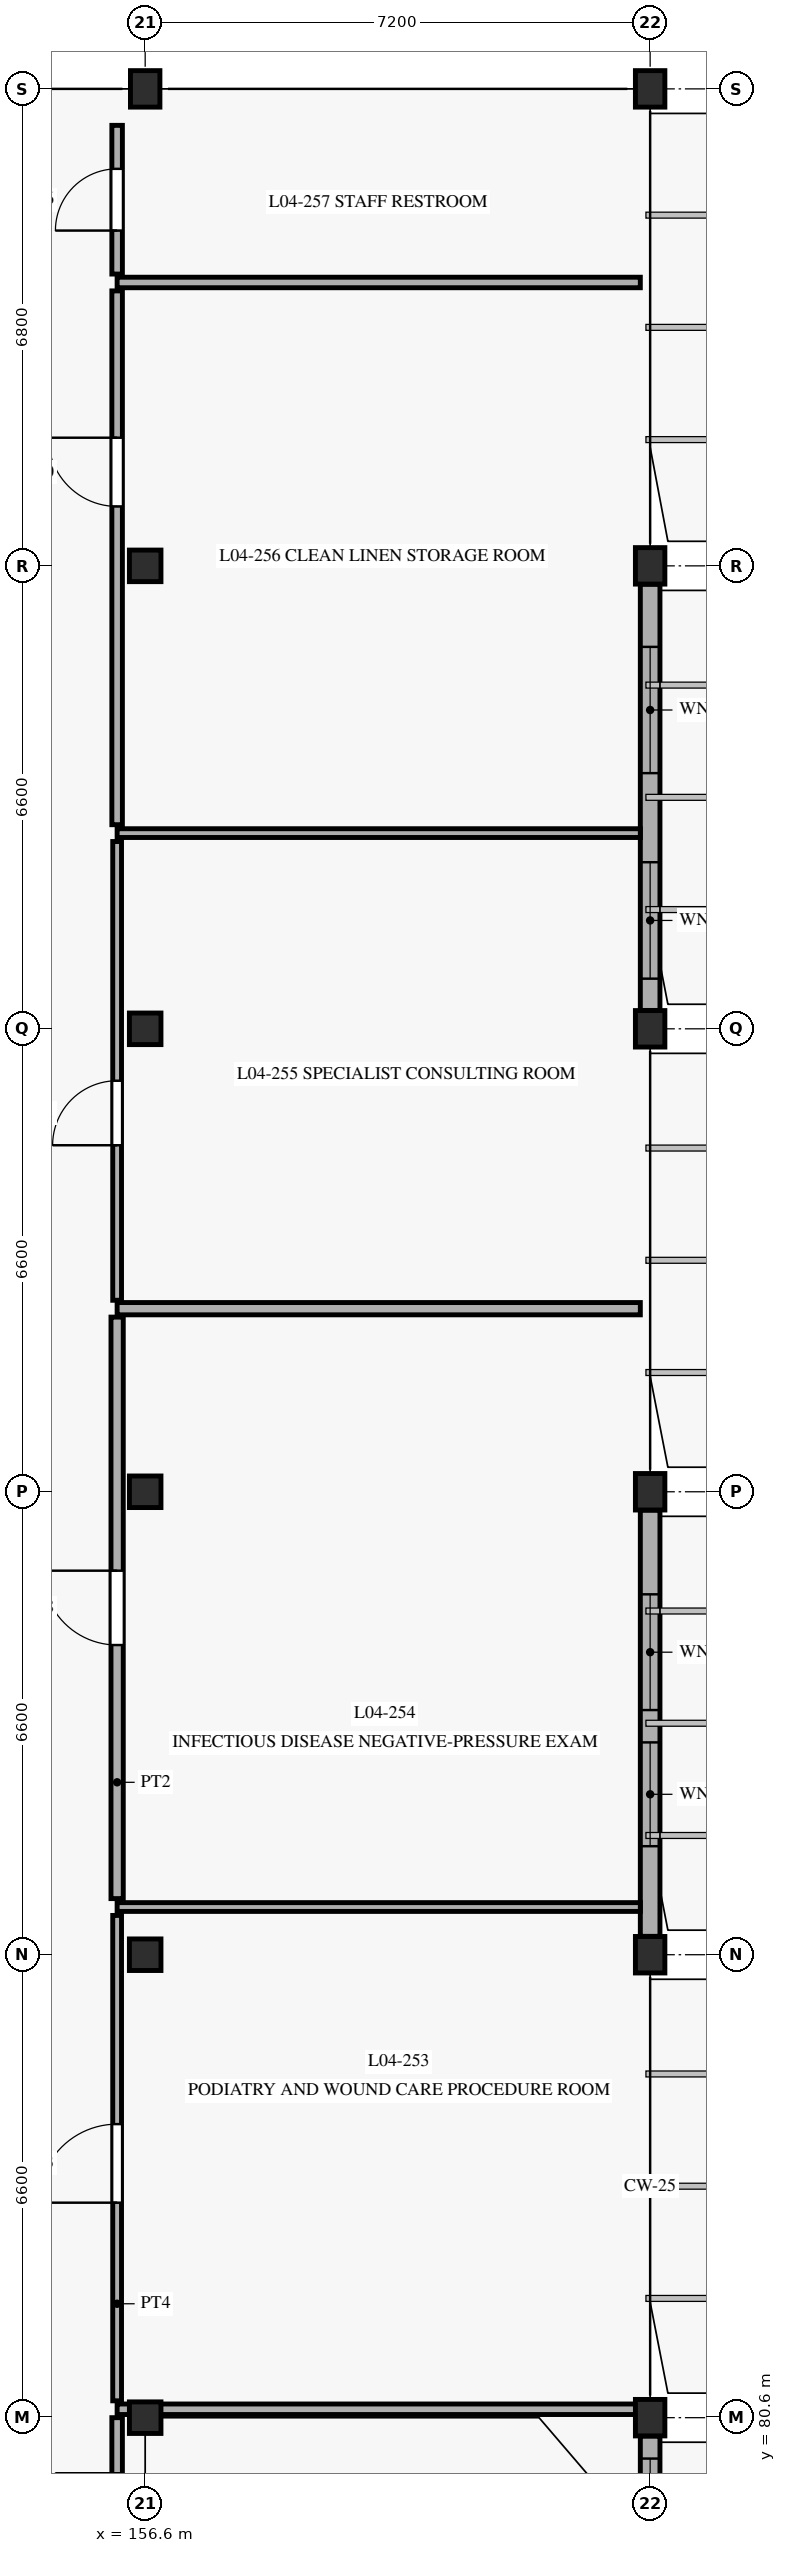
"""IFC4 building model, lengths in metres.
Left out: names, types, materials, properties, quantities, classifications, styles, units other than length and angle.
Written with IfcOpenShell. Run it as: python <this file> out.ifc"""

import sys

from ifc_helpers import new_model, si_unit, direction, frame, frame_2d, origin, origin_with_axes, origin_2d, place, context, subcontext, project, spatial, rectangle, extrude, element, fill, save


model = new_model("IFC4")
c1 = context("Model", 3, precision=1e-05, world=origin(), true_north=direction((0.0, 1.0)))
c2 = subcontext(c1, "Body", "Model", "MODEL_VIEW")
j1 = project(units=[si_unit("LENGTHUNIT", "METRE"), si_unit("PLANEANGLEUNIT", "RADIAN")], contexts=[c1])
p1 = place(None, origin())
s1 = spatial("IfcSite", under=j1, at=p1, CompositionType="ELEMENT")
p2 = place(p1, origin())
s2 = spatial("IfcBuilding", under=s1, at=p2, CompositionType="ELEMENT")
p3 = place(p2, frame((0.0, 0.0, 13.5)))
s3 = spatial("IfcBuildingStorey", under=s2, at=p3, CompositionType="ELEMENT", Elevation=13.5)
for number, where, z_axis, x_axis in (
    (1, (156.6, 80.6, 0.0), (0.0, 0.0, 1.0), (1.0, 0.0, 0.0)),
    (2, (156.6, 87.2, 0.0), (0.0, 0.0, 1.0), (1.0, 0.0, 0.0)),
    (3, (156.6, 93.8, 0.0), (0.0, 0.0, 1.0), (1.0, 0.0, 0.0)),
    (4, (156.6, 100.4, 0.0), (0.0, 0.0, 1.0), (1.0, 0.0, 0.0)),
    (5, (156.6, 107.0, 0.0), (0.0, 0.0, 1.0), (1.0, 0.0, 0.0)),
):
    element("IfcColumn", number, at=place(p3, frame(where, z_axis=z_axis, x_axis=x_axis)), inside=s3, PredefinedType="COLUMN", context=c2, shape_type="SweptSolid", body=[
        extrude(rectangle(XDim=0.45, YDim=0.45, at=origin_2d()), origin(), (0.0, 0.0, 1.0), 4.05),
    ])
for number, where, z_axis, x_axis in (
    (6, (156.6, 113.8, 0.0), (0.0, 0.0, 1.0), (1.0, 0.0, 0.0)),
    (7, (163.8, 80.6, 0.0), (0.0, 0.0, 1.0), (1.0, 0.0, 0.0)),
    (8, (163.8, 87.2, 0.0), (0.0, 0.0, 1.0), (1.0, 0.0, 0.0)),
    (9, (163.8, 93.8, 0.0), (0.0, 0.0, 1.0), (1.0, 0.0, 0.0)),
    (10, (163.8, 100.4, 0.0), (0.0, 0.0, 1.0), (1.0, 0.0, 0.0)),
    (11, (163.8, 107.0, 0.0), (0.0, 0.0, 1.0), (1.0, 0.0, 0.0)),
    (12, (163.8, 113.8, 0.0), (0.0, 0.0, 1.0), (1.0, 0.0, 0.0)),
):
    element("IfcColumn", number, at=place(p3, frame(where, z_axis=z_axis, x_axis=x_axis)), inside=s3, PredefinedType="COLUMN", context=c2, shape_type="SweptSolid", body=[
        extrude(rectangle(XDim=0.42, YDim=0.52, at=origin_2d()), origin(), (0.0, 0.0, 1.0), 4.05),
    ])
p4 = place(p3, frame((163.8, 72.462, 0.0), z_axis=(0.0, 0.0, 1.0), x_axis=(0.0, 1.0, 0.0)))
e13 = element("IfcWall", 13, at=p4, inside=s3, PredefinedType="SOLIDWALL", context=c2, shape_type="SweptSolid", body=[
    extrude(rectangle(XDim=7.876, YDim=0.28, at=frame_2d((3.938, 0.0))), origin(), (0.0, 0.0, 1.0), 3.42),
])
p5 = place(p4, frame((2.306, 0.0, 0.88)))
e14 = element("IfcOpeningElement", 14, at=p5, cuts=e13, PredefinedType="OPENING", context=c2, shape_type="SweptSolid", body=[
    extrude(rectangle(XDim=1.32, YDim=2.15, at=frame_2d((0.66, 1.075))), frame((0.0, 0.15, 0.0), z_axis=(0.0, -1.0, 0.0), x_axis=(1.0, 0.0, 0.0)), (0.0, 0.0, 1.0), 0.3),
])
p6 = place(p4, frame((6.205, 0.0, 0.88)))
e15 = element("IfcOpeningElement", 15, at=p6, cuts=e13, PredefinedType="OPENING", context=c2, shape_type="SweptSolid", body=[
    extrude(rectangle(XDim=1.35, YDim=1.85, at=frame_2d((0.675, 0.925))), frame((0.0, 0.15, 0.0), z_axis=(0.0, -1.0, 0.0), x_axis=(1.0, 0.0, 0.0)), (0.0, 0.0, 1.0), 0.3),
])
p7 = place(p3, frame((163.8, 87.462, 0.0), z_axis=(0.0, 0.0, 1.0), x_axis=(0.0, 1.0, 0.0)))
e16 = element("IfcWall", 16, at=p7, inside=s3, PredefinedType="SOLIDWALL", context=c2, shape_type="SweptSolid", body=[
    extrude(rectangle(XDim=6.076, YDim=0.28, at=frame_2d((3.038, 0.0))), origin(), (0.0, 0.0, 1.0), 3.42),
])
p8 = place(p7, frame((1.285, 0.0, 0.88)))
e17 = element("IfcOpeningElement", 17, at=p8, cuts=e16, PredefinedType="OPENING", context=c2, shape_type="SweptSolid", body=[
    extrude(rectangle(XDim=1.48, YDim=2.15, at=frame_2d((0.74, 1.075))), frame((0.0, 0.15, 0.0), z_axis=(0.0, -1.0, 0.0), x_axis=(1.0, 0.0, 0.0)), (0.0, 0.0, 1.0), 0.3),
])
p9 = place(p7, frame((3.226, 0.0, 0.88)))
e18 = element("IfcOpeningElement", 18, at=p9, cuts=e16, PredefinedType="OPENING", context=c2, shape_type="SweptSolid", body=[
    extrude(rectangle(XDim=1.65, YDim=1.85, at=frame_2d((0.825, 0.925))), frame((0.0, 0.15, 0.0), z_axis=(0.0, -1.0, 0.0), x_axis=(1.0, 0.0, 0.0)), (0.0, 0.0, 1.0), 0.3),
])
p10 = place(p3, frame((163.8, 100.662, 0.0), z_axis=(0.0, 0.0, 1.0), x_axis=(0.0, 1.0, 0.0)))
e19 = element("IfcWall", 19, at=p10, inside=s3, PredefinedType="SOLIDWALL", context=c2, shape_type="SweptSolid", body=[
    extrude(rectangle(XDim=6.076, YDim=0.28, at=frame_2d((3.038, 0.0))), origin(), (0.0, 0.0, 1.0), 3.42),
])
p11 = place(p10, frame((0.453, 0.0, 0.88)))
e20 = element("IfcOpeningElement", 20, at=p11, cuts=e19, PredefinedType="OPENING", context=c2, shape_type="SweptSolid", body=[
    extrude(rectangle(XDim=1.66, YDim=2.15, at=frame_2d((0.83, 1.075))), frame((0.0, 0.15, 0.0), z_axis=(0.0, -1.0, 0.0), x_axis=(1.0, 0.0, 0.0)), (0.0, 0.0, 1.0), 0.3),
])
p12 = place(p10, frame((3.383, 0.0, 0.88)))
e21 = element("IfcOpeningElement", 21, at=p12, cuts=e19, PredefinedType="OPENING", context=c2, shape_type="SweptSolid", body=[
    extrude(rectangle(XDim=1.8, YDim=1.85, at=frame_2d((0.9, 0.925))), frame((0.0, 0.15, 0.0), z_axis=(0.0, -1.0, 0.0), x_axis=(1.0, 0.0, 0.0)), (0.0, 0.0, 1.0), 0.3),
])
p13 = place(p3, frame((156.2, 78.49, 0.0), z_axis=(0.0, 0.0, 1.0), x_axis=(0.0, 1.0, 0.0)))
e22 = element("IfcWall", 22, at=p13, inside=s3, PredefinedType="PARTITIONING", context=c2, shape_type="SweptSolid", body=[
    extrude(rectangle(XDim=2.11, YDim=0.15, at=frame_2d((1.055, 0.0))), origin(), (0.0, 0.0, 1.0), 3.365),
])
p14 = place(p13, frame((0.438, 0.0, 0.0)))
e23 = element("IfcOpeningElement", 23, at=p14, cuts=e22, PredefinedType="OPENING", context=c2, shape_type="SweptSolid", body=[
    extrude(rectangle(XDim=0.88, YDim=2.1, at=frame_2d((0.44, 1.05))), frame((0.0, 0.085, 0.0), z_axis=(0.0, -1.0, 0.0), x_axis=(1.0, 0.0, 0.0)), (0.0, 0.0, 1.0), 0.17),
])
p15 = place(p3, frame((156.2, 80.72, 0.0), z_axis=(0.0, 0.0, 1.0), x_axis=(1.0, 0.0, 0.0)))
e24 = element("IfcWall", 24, at=p15, inside=s3, PredefinedType="PARTITIONING", context=c2, shape_type="SweptSolid", body=[
    extrude(rectangle(XDim=7.46, YDim=0.15, at=frame_2d((3.73, 0.0))), origin(), (0.0, 0.0, 1.0), 3.365),
])
p16 = place(p3, frame((156.2, 80.84, 0.0), z_axis=(0.0, 0.0, 1.0), x_axis=(0.0, 1.0, 0.0)))
e25 = element("IfcWall", 25, at=p16, inside=s3, PredefinedType="PARTITIONING", context=c2, shape_type="SweptSolid", body=[
    extrude(rectangle(XDim=6.92, YDim=0.125, at=frame_2d((3.46, 0.0))), origin(), (0.0, 0.0, 1.0), 3.365),
])
p17 = place(p16, frame((2.825, 0.0, 0.0)))
e26 = element("IfcOpeningElement", 26, at=p17, cuts=e25, PredefinedType="OPENING", context=c2, shape_type="SweptSolid", body=[
    extrude(rectangle(XDim=1.12, YDim=2.2, at=frame_2d((0.56, 1.1))), frame((0.0, 0.073, 0.0), z_axis=(0.0, -1.0, 0.0), x_axis=(1.0, 0.0, 0.0)), (0.0, 0.0, 1.0), 0.145),
])
p18 = place(p3, frame((156.2, 87.88, 0.0), z_axis=(0.0, 0.0, 1.0), x_axis=(1.0, 0.0, 0.0)))
e27 = element("IfcWall", 27, at=p18, inside=s3, PredefinedType="PARTITIONING", context=c2, shape_type="SweptSolid", body=[
    extrude(rectangle(XDim=7.46, YDim=0.125, at=frame_2d((3.73, 0.0))), origin(), (0.0, 0.0, 1.0), 3.385),
])
p19 = place(p3, frame((156.2, 88.0, 0.0), z_axis=(0.0, 0.0, 1.0), x_axis=(0.0, 1.0, 0.0)))
e28 = element("IfcWall", 28, at=p19, inside=s3, PredefinedType="PARTITIONING", context=c2, shape_type="SweptSolid", body=[
    extrude(rectangle(XDim=8.29, YDim=0.175, at=frame_2d((4.145, 0.0))), origin(), (0.0, 0.0, 1.0), 3.365),
])
p20 = place(p19, frame((3.615, 0.0, 0.0)))
e29 = element("IfcOpeningElement", 29, at=p20, cuts=e28, PredefinedType="OPENING", context=c2, shape_type="SweptSolid", body=[
    extrude(rectangle(XDim=1.06, YDim=2.2, at=frame_2d((0.53, 1.1))), frame((0.0, 0.098, 0.0), z_axis=(0.0, -1.0, 0.0), x_axis=(1.0, 0.0, 0.0)), (0.0, 0.0, 1.0), 0.195),
])
p21 = place(p3, frame((156.2, 96.41, 0.0), z_axis=(0.0, 0.0, 1.0), x_axis=(1.0, 0.0, 0.0)))
e30 = element("IfcWall", 30, at=p21, inside=s3, PredefinedType="PARTITIONING", context=c2, shape_type="SweptSolid", body=[
    extrude(rectangle(XDim=7.46, YDim=0.175, at=frame_2d((3.73, 0.0))), origin(), (0.0, 0.0, 1.0), 3.385),
])
p22 = place(p3, frame((156.2, 96.53, 0.0), z_axis=(0.0, 0.0, 1.0), x_axis=(0.0, 1.0, 0.0)))
e31 = element("IfcWall", 31, at=p22, inside=s3, PredefinedType="PARTITIONING", context=c2, shape_type="SweptSolid", body=[
    extrude(rectangle(XDim=6.54, YDim=0.125, at=frame_2d((3.27, 0.0))), origin(), (0.0, 0.0, 1.0), 3.365),
])
p23 = place(p22, frame((2.21, 0.0, 0.0)))
e32 = element("IfcOpeningElement", 32, at=p23, cuts=e31, PredefinedType="OPENING", context=c2, shape_type="SweptSolid", body=[
    extrude(rectangle(XDim=0.92, YDim=2.15, at=frame_2d((0.46, 1.075))), frame((0.0, 0.073, 0.0), z_axis=(0.0, -1.0, 0.0), x_axis=(1.0, 0.0, 0.0)), (0.0, 0.0, 1.0), 0.145),
])
p24 = place(p3, frame((156.2, 103.19, 0.0), z_axis=(0.0, 0.0, 1.0), x_axis=(1.0, 0.0, 0.0)))
e33 = element("IfcWall", 33, at=p24, inside=s3, PredefinedType="PARTITIONING", context=c2, shape_type="SweptSolid", body=[
    extrude(rectangle(XDim=7.46, YDim=0.125, at=frame_2d((3.73, 0.0))), origin(), (0.0, 0.0, 1.0), 3.385),
])
p25 = place(p3, frame((156.2, 103.31, 0.0), z_axis=(0.0, 0.0, 1.0), x_axis=(0.0, 1.0, 0.0)))
e34 = element("IfcWall", 34, at=p25, inside=s3, PredefinedType="PARTITIONING", context=c2, shape_type="SweptSolid", body=[
    extrude(rectangle(XDim=7.61, YDim=0.15, at=frame_2d((3.805, 0.0))), origin(), (0.0, 0.0, 1.0), 3.365),
])
p26 = place(p25, frame((4.537, 0.0, 0.0)))
e35 = element("IfcOpeningElement", 35, at=p26, cuts=e34, PredefinedType="OPENING", context=c2, shape_type="SweptSolid", body=[
    extrude(rectangle(XDim=0.98, YDim=2.12, at=frame_2d((0.49, 1.06))), frame((0.0, 0.085, 0.0), z_axis=(0.0, -1.0, 0.0), x_axis=(1.0, 0.0, 0.0)), (0.0, 0.0, 1.0), 0.17),
])
p27 = place(p3, frame((156.2, 111.04, 0.0), z_axis=(0.0, 0.0, 1.0), x_axis=(1.0, 0.0, 0.0)))
e36 = element("IfcWall", 36, at=p27, inside=s3, PredefinedType="PARTITIONING", context=c2, shape_type="SweptSolid", body=[
    extrude(rectangle(XDim=7.46, YDim=0.15, at=frame_2d((3.73, 0.0))), origin(), (0.0, 0.0, 1.0), 3.385),
])
p28 = place(p3, frame((156.2, 111.16, 0.0), z_axis=(0.0, 0.0, 1.0), x_axis=(0.0, 1.0, 0.0)))
e37 = element("IfcWall", 37, at=p28, inside=s3, PredefinedType="PARTITIONING", context=c2, shape_type="SweptSolid", body=[
    extrude(rectangle(XDim=2.12, YDim=0.15, at=frame_2d((1.06, 0.0))), origin(), (0.0, 0.0, 1.0), 3.765),
])
p29 = place(p28, frame((0.62, 0.0, 0.0)))
e38 = element("IfcOpeningElement", 38, at=p29, cuts=e37, PredefinedType="OPENING", context=c2, shape_type="SweptSolid", body=[
    extrude(rectangle(XDim=0.88, YDim=2.1, at=frame_2d((0.44, 1.05))), frame((0.0, 0.085, 0.0), z_axis=(0.0, -1.0, 0.0), x_axis=(1.0, 0.0, 0.0)), (0.0, 0.0, 1.0), 0.17),
])
p30 = place(p6, origin_with_axes())
e39 = element("IfcWindow", 39, at=p30, inside=s3, PartitioningType="SINGLE_PANEL", PredefinedType="WINDOW", context=c2, shape_type="SweptSolid", body=[
    extrude(rectangle(XDim=1.35, YDim=1.85, at=frame_2d((0.675, 0.925))), frame((0.0, 0.03, 0.0), z_axis=(0.0, -1.0, 0.0), x_axis=(1.0, 0.0, 0.0)), (0.0, 0.0, 1.0), 0.06),
])
fill(e15, e39)
p31 = place(p8, origin_with_axes())
e40 = element("IfcWindow", 40, at=p31, inside=s3, PartitioningType="SINGLE_PANEL", PredefinedType="WINDOW", context=c2, shape_type="SweptSolid", body=[
    extrude(rectangle(XDim=1.48, YDim=2.15, at=frame_2d((0.74, 1.075))), frame((0.0, 0.03, 0.0), z_axis=(0.0, -1.0, 0.0), x_axis=(1.0, 0.0, 0.0)), (0.0, 0.0, 1.0), 0.06),
])
fill(e17, e40)
p32 = place(p9, origin_with_axes())
e41 = element("IfcWindow", 41, at=p32, inside=s3, PartitioningType="SINGLE_PANEL", PredefinedType="WINDOW", context=c2, shape_type="SweptSolid", body=[
    extrude(rectangle(XDim=1.65, YDim=1.85, at=frame_2d((0.825, 0.925))), frame((0.0, 0.03, 0.0), z_axis=(0.0, -1.0, 0.0), x_axis=(1.0, 0.0, 0.0)), (0.0, 0.0, 1.0), 0.06),
])
fill(e18, e41)
p33 = place(p11, origin_with_axes())
e42 = element("IfcWindow", 42, at=p33, inside=s3, PartitioningType="SINGLE_PANEL", PredefinedType="WINDOW", context=c2, shape_type="SweptSolid", body=[
    extrude(rectangle(XDim=1.66, YDim=2.15, at=frame_2d((0.83, 1.075))), frame((0.0, 0.03, 0.0), z_axis=(0.0, -1.0, 0.0), x_axis=(1.0, 0.0, 0.0)), (0.0, 0.0, 1.0), 0.06),
])
fill(e20, e42)
p34 = place(p12, origin_with_axes())
e43 = element("IfcWindow", 43, at=p34, inside=s3, PartitioningType="SINGLE_PANEL", PredefinedType="WINDOW", context=c2, shape_type="SweptSolid", body=[
    extrude(rectangle(XDim=1.8, YDim=1.85, at=frame_2d((0.9, 0.925))), frame((0.0, 0.03, 0.0), z_axis=(0.0, -1.0, 0.0), x_axis=(1.0, 0.0, 0.0)), (0.0, 0.0, 1.0), 0.06),
])
fill(e21, e43)
p35 = place(p14, frame((0.88, 0.0, 0.0), z_axis=(0.0, 0.0, 1.0), x_axis=(-1.0, 0.0, 0.0)))
e44 = element("IfcDoor", 44, at=p35, inside=s3, OperationType="SINGLE_SWING_LEFT", PredefinedType="DOOR", context=c2, shape_type="SweptSolid", body=[
    extrude(rectangle(XDim=0.88, YDim=2.1, at=frame_2d((0.44, 1.05))), frame((0.0, 0.025, 0.0), z_axis=(0.0, -1.0, 0.0), x_axis=(1.0, 0.0, 0.0)), (0.0, 0.0, 1.0), 0.05),
])
fill(e23, e44)
p36 = place(p17, frame((1.12, 0.0, 0.0), z_axis=(0.0, 0.0, 1.0), x_axis=(-1.0, 0.0, 0.0)))
e45 = element("IfcDoor", 45, at=p36, inside=s3, OperationType="SINGLE_SWING_RIGHT", PredefinedType="DOOR", context=c2, shape_type="SweptSolid", body=[
    extrude(rectangle(XDim=1.12, YDim=2.2, at=frame_2d((0.56, 1.1))), frame((0.0, 0.025, 0.0), z_axis=(0.0, -1.0, 0.0), x_axis=(1.0, 0.0, 0.0)), (0.0, 0.0, 1.0), 0.05),
])
fill(e26, e45)
p37 = place(p20, frame((1.06, 0.0, 0.0), z_axis=(0.0, 0.0, 1.0), x_axis=(-1.0, 0.0, 0.0)))
e46 = element("IfcDoor", 46, at=p37, inside=s3, OperationType="SINGLE_SWING_LEFT", PredefinedType="DOOR", context=c2, shape_type="SweptSolid", body=[
    extrude(rectangle(XDim=1.06, YDim=2.2, at=frame_2d((0.53, 1.1))), frame((0.0, 0.025, 0.0), z_axis=(0.0, -1.0, 0.0), x_axis=(1.0, 0.0, 0.0)), (0.0, 0.0, 1.0), 0.05),
])
fill(e29, e46)
p38 = place(p23, frame((0.92, 0.0, 0.0), z_axis=(0.0, 0.0, 1.0), x_axis=(-1.0, 0.0, 0.0)))
e47 = element("IfcDoor", 47, at=p38, inside=s3, OperationType="SINGLE_SWING_RIGHT", PredefinedType="DOOR", context=c2, shape_type="SweptSolid", body=[
    extrude(rectangle(XDim=0.92, YDim=2.15, at=frame_2d((0.46, 1.075))), frame((0.0, 0.025, 0.0), z_axis=(0.0, -1.0, 0.0), x_axis=(1.0, 0.0, 0.0)), (0.0, 0.0, 1.0), 0.05),
])
fill(e32, e47)
p39 = place(p26, frame((0.98, 0.0, 0.0), z_axis=(0.0, 0.0, 1.0), x_axis=(-1.0, 0.0, 0.0)))
e48 = element("IfcDoor", 48, at=p39, inside=s3, OperationType="SINGLE_SWING_LEFT", PredefinedType="DOOR", context=c2, shape_type="SweptSolid", body=[
    extrude(rectangle(XDim=0.98, YDim=2.12, at=frame_2d((0.49, 1.06))), frame((0.0, 0.025, 0.0), z_axis=(0.0, -1.0, 0.0), x_axis=(1.0, 0.0, 0.0)), (0.0, 0.0, 1.0), 0.05),
])
fill(e35, e48)
p40 = place(p29, frame((0.88, 0.0, 0.0), z_axis=(0.0, 0.0, 1.0), x_axis=(-1.0, 0.0, 0.0)))
e49 = element("IfcDoor", 49, at=p40, inside=s3, OperationType="SINGLE_SWING_RIGHT", PredefinedType="DOOR", context=c2, shape_type="SweptSolid", body=[
    extrude(rectangle(XDim=0.88, YDim=2.1, at=frame_2d((0.44, 1.05))), frame((0.0, 0.025, 0.0), z_axis=(0.0, -1.0, 0.0), x_axis=(1.0, 0.0, 0.0)), (0.0, 0.0, 1.0), 0.05),
])
fill(e38, e49)
save(model, sys.argv[1])
